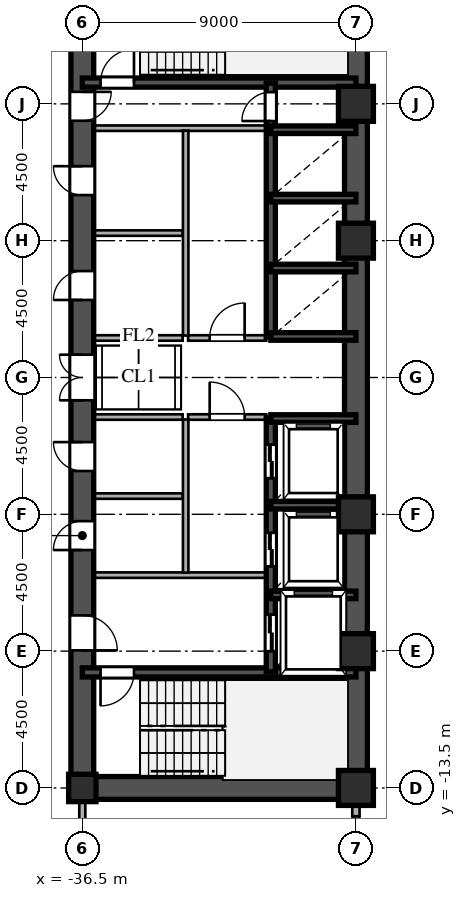
"""IFC4 building model, lengths in metres.
Left out: names, types, materials, properties, quantities, classifications, styles, units other than length and angle.
Written with IfcOpenShell. Run it as: python <this file> out.ifc"""

import sys

from ifc_helpers import new_model, si_unit, direction, frame, frame_2d, origin, origin_2d, place, context, subcontext, project, spatial, rectangle, hollow_rectangle, i_section, extrude, source, transform, mapped, element, fill, save


model = new_model("IFC4")
c1 = context("Model", 3, precision=1e-05, world=origin(), true_north=direction((0.0, 1.0)))
c2 = subcontext(c1, "Body", "Model", "MODEL_VIEW")
j1 = project(units=[si_unit("LENGTHUNIT", "METRE"), si_unit("PLANEANGLEUNIT", "RADIAN")], contexts=[c1])
p1 = place(None, origin())
s1 = spatial("IfcSite", under=j1, at=p1, CompositionType="ELEMENT")
p2 = place(p1, origin())
s2 = spatial("IfcBuilding", under=s1, at=p2, CompositionType="ELEMENT")
p3 = place(p2, frame((0.0, 0.0, 29.7)))
s3 = spatial("IfcBuildingStorey", under=s2, at=p3, CompositionType="ELEMENT", Elevation=29.7)
m1 = source(origin(), c2, "Body", "SweptSolid", [
    extrude(hollow_rectangle(XDim=1.15, YDim=1.15, WallThickness=0.048, at=origin_2d()), origin(), (0.0, 0.0, 1.0), 3.6),
])
for number, where, z_axis, x_axis in (
    (1, (-27.5, -13.5, 0.0), (0.0, 0.0, 1.0), (1.0, 0.0, 0.0)),
    (2, (-27.5, -9.0, 0.0), (0.0, 0.0, 1.0), (1.0, 0.0, 0.0)),
    (3, (-27.5, -4.5, 0.0), (0.0, 0.0, 1.0), (1.0, 0.0, 0.0)),
    (4, (-27.5, 4.5, 0.0), (0.0, 0.0, 1.0), (1.0, 0.0, 0.0)),
    (5, (-27.5, 9.0, 0.0), (0.0, 0.0, 1.0), (1.0, 0.0, 0.0)),
):
    element("IfcColumn", number, at=place(p3, frame(where, z_axis=z_axis, x_axis=x_axis)), inside=s3, PredefinedType="COLUMN", context=c2, shape_type="MappedRepresentation", body=[
        mapped(m1, transform((0.0, 0.0, 0.0), scale=1.0)),
    ])
m2 = source(origin(), c2, "Body", "SweptSolid", [
    extrude(i_section(OverallWidth=0.9, OverallDepth=0.9, WebThickness=0.036, FlangeThickness=0.055, at=origin_2d()), origin(), (0.0, 0.0, 1.0), 3.6),
])
p4 = place(p3, frame((-36.5, -13.5, 0.0), z_axis=(0.0, 0.0, 1.0), x_axis=(1.0, 0.0, 0.0)))
e6 = element("IfcColumn", 6, at=p4, inside=s3, PredefinedType="COLUMN", context=c2, shape_type="MappedRepresentation", body=[
    mapped(m2, transform((0.0, 0.0, 0.0), scale=1.0)),
])
p5 = place(p3, frame((-27.5, -14.43, 0.0), z_axis=(0.0, 0.0, 1.0), x_axis=(0.0, 1.0, 0.0)))
e7 = element("IfcWall", 7, at=p5, inside=s3, PredefinedType="SOLIDWALL", context=c2, shape_type="SweptSolid", body=[
    extrude(rectangle(XDim=0.55, YDim=0.24, at=frame_2d((0.275, 0.0))), origin(), (0.0, 0.0, 1.0), 2.88),
])
for number, where, z_axis, x_axis in (
    (8, (-27.5, -13.5, 0.0), (0.0, 0.0, 1.0), (0.0, 1.0, 0.0)),
    (9, (-27.5, 1.3, 0.0), (0.0, 0.0, 1.0), (0.0, 1.0, 0.0)),
):
    element("IfcWall", number, at=place(p3, frame(where, z_axis=z_axis, x_axis=x_axis)), inside=s3, PredefinedType="SHEAR", context=c2, shape_type="SweptSolid", body=[
        extrude(rectangle(XDim=12.2, YDim=0.75, at=frame_2d((6.1, 0.0))), origin(), (0.0, 0.0, 1.0), 3.38),
    ])
p6 = place(p3, frame((-27.5, -1.3, 0.0), z_axis=(0.0, 0.0, 1.0), x_axis=(0.0, 1.0, 0.0)))
e10 = element("IfcWall", 10, at=p6, inside=s3, PredefinedType="SHEAR", context=c2, shape_type="SweptSolid", body=[
    extrude(rectangle(XDim=2.6, YDim=0.75, at=frame_2d((1.3, 0.0))), origin(), (0.0, 0.0, 1.0), 3.38),
])
p7 = place(p3, frame((-36.5, -13.5, 0.0), z_axis=(0.0, 0.0, 1.0), x_axis=(1.0, 0.0, 0.0)))
e11 = element("IfcWall", 11, at=p7, inside=s3, PredefinedType="SHEAR", context=c2, shape_type="SweptSolid", body=[
    extrude(rectangle(XDim=9.0, YDim=0.75, at=frame_2d((4.5, 0.0))), origin(), (0.0, 0.0, 1.0), 3.38),
])
p8 = place(p3, frame((-36.5, -13.65, 0.0), z_axis=(0.0, 0.0, 1.0), x_axis=(0.0, 1.0, 0.0)))
e12 = element("IfcWall", 12, at=p8, inside=s3, PredefinedType="SHEAR", context=c2, shape_type="SweptSolid", body=[
    extrude(rectangle(XDim=7.15, YDim=0.75, at=frame_2d((3.575, 0.0))), origin(), (0.0, 0.0, 1.0), 3.38),
])
p9 = place(p8, frame((4.675, 0.0, 0.0)))
e13 = element("IfcOpeningElement", 13, at=p9, cuts=e12, PredefinedType="OPENING", context=c2, shape_type="SweptSolid", body=[
    extrude(rectangle(XDim=1.15, YDim=2.2, at=frame_2d((0.575, 1.1))), frame((0.0, 0.385, 0.0), z_axis=(0.0, -1.0, 0.0), x_axis=(1.0, 0.0, 0.0)), (0.0, 0.0, 1.0), 0.77),
])
p10 = place(p3, frame((-36.5, -1.3, 0.0), z_axis=(0.0, 0.0, 1.0), x_axis=(0.0, 1.0, 0.0)))
e14 = element("IfcWall", 14, at=p10, inside=s3, PredefinedType="SHEAR", context=c2, shape_type="SweptSolid", body=[
    extrude(rectangle(XDim=2.6, YDim=0.75, at=frame_2d((1.3, 0.0))), origin(), (0.0, 0.0, 1.0), 3.38),
])
p11 = place(p10, frame((0.55, 0.0, 0.0)))
e15 = element("IfcOpeningElement", 15, at=p11, cuts=e14, PredefinedType="OPENING", context=c2, shape_type="SweptSolid", body=[
    extrude(rectangle(XDim=1.5, YDim=2.3, at=frame_2d((0.75, 1.15))), frame((0.0, 0.385, 0.0), z_axis=(0.0, -1.0, 0.0), x_axis=(1.0, 0.0, 0.0)), (0.0, 0.0, 1.0), 0.77),
])
p12 = place(p3, frame((-36.5, 8.2, 0.0), z_axis=(0.0, 0.0, 1.0), x_axis=(0.0, 1.0, 0.0)))
e16 = element("IfcWall", 16, at=p12, inside=s3, PredefinedType="SHEAR", context=c2, shape_type="SweptSolid", body=[
    extrude(rectangle(XDim=5.45, YDim=0.75, at=frame_2d((2.725, 0.0))), origin(), (0.0, 0.0, 1.0), 3.38),
])
p13 = place(p12, frame((0.245, 0.0, 0.0)))
e17 = element("IfcOpeningElement", 17, at=p13, cuts=e16, PredefinedType="OPENING", context=c2, shape_type="SweptSolid", body=[
    extrude(rectangle(XDim=0.95, YDim=2.15, at=frame_2d((0.475, 1.075))), frame((0.0, 0.385, 0.0), z_axis=(0.0, -1.0, 0.0), x_axis=(1.0, 0.0, 0.0)), (0.0, 0.0, 1.0), 0.77),
])
p14 = place(p3, frame((-36.5, -6.5, 0.0), z_axis=(0.0, 0.0, 1.0), x_axis=(0.0, 1.0, 0.0)))
e18 = element("IfcWall", 18, at=p14, inside=s3, PredefinedType="SHEAR", context=c2, shape_type="SweptSolid", body=[
    extrude(rectangle(XDim=2.6, YDim=0.75, at=frame_2d((1.3, 0.0))), origin(), (0.0, 0.0, 1.0), 3.38),
])
p15 = place(p14, frame((0.825, 0.0, 0.0)))
e19 = element("IfcOpeningElement", 19, at=p15, cuts=e18, PredefinedType="OPENING", context=c2, shape_type="SweptSolid", body=[
    extrude(rectangle(XDim=0.95, YDim=2.15, at=frame_2d((0.475, 1.075))), frame((0.0, 0.385, 0.0), z_axis=(0.0, -1.0, 0.0), x_axis=(1.0, 0.0, 0.0)), (0.0, 0.0, 1.0), 0.77),
])
p16 = place(p3, frame((-36.5, -3.9, 0.0), z_axis=(0.0, 0.0, 1.0), x_axis=(0.0, 1.0, 0.0)))
e20 = element("IfcWall", 20, at=p16, inside=s3, PredefinedType="SHEAR", context=c2, shape_type="SweptSolid", body=[
    extrude(rectangle(XDim=2.6, YDim=0.75, at=frame_2d((1.3, 0.0))), origin(), (0.0, 0.0, 1.0), 3.38),
])
p17 = place(p16, frame((0.825, 0.0, 0.0)))
e21 = element("IfcOpeningElement", 21, at=p17, cuts=e20, PredefinedType="OPENING", context=c2, shape_type="SweptSolid", body=[
    extrude(rectangle(XDim=0.95, YDim=2.15, at=frame_2d((0.475, 1.075))), frame((0.0, 0.385, 0.0), z_axis=(0.0, -1.0, 0.0), x_axis=(1.0, 0.0, 0.0)), (0.0, 0.0, 1.0), 0.77),
])
p18 = place(p3, frame((-36.5, 1.3, 0.0), z_axis=(0.0, 0.0, 1.0), x_axis=(0.0, 1.0, 0.0)))
e22 = element("IfcWall", 22, at=p18, inside=s3, PredefinedType="SHEAR", context=c2, shape_type="SweptSolid", body=[
    extrude(rectangle(XDim=3.45, YDim=0.75, at=frame_2d((1.725, 0.0))), origin(), (0.0, 0.0, 1.0), 3.38),
])
p19 = place(p18, frame((1.25, 0.0, 0.0)))
e23 = element("IfcOpeningElement", 23, at=p19, cuts=e22, PredefinedType="OPENING", context=c2, shape_type="SweptSolid", body=[
    extrude(rectangle(XDim=0.95, YDim=2.15, at=frame_2d((0.475, 1.075))), frame((0.0, 0.385, 0.0), z_axis=(0.0, -1.0, 0.0), x_axis=(1.0, 0.0, 0.0)), (0.0, 0.0, 1.0), 0.77),
])
p20 = place(p3, frame((-36.5, 4.75, 0.0), z_axis=(0.0, 0.0, 1.0), x_axis=(0.0, 1.0, 0.0)))
e24 = element("IfcWall", 24, at=p20, inside=s3, PredefinedType="SHEAR", context=c2, shape_type="SweptSolid", body=[
    extrude(rectangle(XDim=3.45, YDim=0.75, at=frame_2d((1.725, 0.0))), origin(), (0.0, 0.0, 1.0), 3.38),
])
p21 = place(p20, frame((1.25, 0.0, 0.0)))
e25 = element("IfcOpeningElement", 25, at=p21, cuts=e24, PredefinedType="OPENING", context=c2, shape_type="SweptSolid", body=[
    extrude(rectangle(XDim=0.95, YDim=2.15, at=frame_2d((0.475, 1.075))), frame((0.0, 0.385, 0.0), z_axis=(0.0, -1.0, 0.0), x_axis=(1.0, 0.0, 0.0)), (0.0, 0.0, 1.0), 0.77),
])
p22 = place(p3, frame((-36.5, -9.7, 0.0), z_axis=(0.0, 0.0, 1.0), x_axis=(1.0, 0.0, 0.0)))
e26 = element("IfcWall", 26, at=p22, inside=s3, PredefinedType="SHEAR", context=c2, shape_type="SweptSolid", body=[
    extrude(rectangle(XDim=9.0, YDim=0.3, at=frame_2d((4.5, 0.0))), origin(), (0.0, 0.0, 1.0), 3.38),
])
p23 = place(p22, frame((0.6, 0.0, 0.0)))
e27 = element("IfcOpeningElement", 27, at=p23, cuts=e26, PredefinedType="OPENING", context=c2, shape_type="SweptSolid", body=[
    extrude(rectangle(XDim=1.1, YDim=2.2, at=frame_2d((0.55, 1.1))), frame((0.0, 0.16, 0.0), z_axis=(0.0, -1.0, 0.0), x_axis=(1.0, 0.0, 0.0)), (0.0, 0.0, 1.0), 0.32),
])
p24 = place(p3, frame((-36.5, 9.7, 0.0), z_axis=(0.0, 0.0, 1.0), x_axis=(1.0, 0.0, 0.0)))
e28 = element("IfcWall", 28, at=p24, inside=s3, PredefinedType="SHEAR", context=c2, shape_type="SweptSolid", body=[
    extrude(rectangle(XDim=9.0, YDim=0.3, at=frame_2d((4.5, 0.0))), origin(), (0.0, 0.0, 1.0), 3.38),
])
p25 = place(p24, frame((0.6, 0.0, 0.0)))
e29 = element("IfcOpeningElement", 29, at=p25, cuts=e28, PredefinedType="OPENING", context=c2, shape_type="SweptSolid", body=[
    extrude(rectangle(XDim=1.1, YDim=2.2, at=frame_2d((0.55, 1.1))), frame((0.0, 0.16, 0.0), z_axis=(0.0, -1.0, 0.0), x_axis=(1.0, 0.0, 0.0)), (0.0, 0.0, 1.0), 0.32),
])
for number, where, z_axis, x_axis in (
    (30, (-30.3, -7.15, 0.0), (0.0, 0.0, 1.0), (1.0, 0.0, 0.0)),
    (31, (-30.3, -4.2, 0.0), (0.0, 0.0, 1.0), (1.0, 0.0, 0.0)),
    (32, (-30.3, -1.35, 0.0), (0.0, 0.0, 1.0), (1.0, 0.0, 0.0)),
    (33, (-30.3, 1.35, 0.0), (0.0, 0.0, 1.0), (1.0, 0.0, 0.0)),
    (34, (-30.3, 3.6, 0.0), (0.0, 0.0, 1.0), (1.0, 0.0, 0.0)),
    (35, (-30.3, 5.9, 0.0), (0.0, 0.0, 1.0), (1.0, 0.0, 0.0)),
    (36, (-30.3, 8.15, 0.0), (0.0, 0.0, 1.0), (1.0, 0.0, 0.0)),
):
    element("IfcWall", number, at=place(p3, frame(where, z_axis=z_axis, x_axis=x_axis)), inside=s3, PredefinedType="SHEAR", context=c2, shape_type="SweptSolid", body=[
        extrude(rectangle(XDim=2.8, YDim=0.25, at=frame_2d((1.4, 0.0))), origin(), (0.0, 0.0, 1.0), 3.38),
    ])
p26 = place(p3, frame((-30.3, -9.68, 0.0), z_axis=(0.0, 0.0, 1.0), x_axis=(0.0, 1.0, 0.0)))
e37 = element("IfcWall", 37, at=p26, inside=s3, PredefinedType="SHEAR", context=c2, shape_type="SweptSolid", body=[
    extrude(rectangle(XDim=2.56, YDim=0.3, at=frame_2d((1.28, 0.0))), origin(), (0.0, 0.0, 1.0), 3.38),
])
p27 = place(p26, frame((0.68, 0.0, 0.0)))
e38 = element("IfcOpeningElement", 38, at=p27, cuts=e37, PredefinedType="OPENING", context=c2, shape_type="SweptSolid", body=[
    extrude(rectangle(XDim=1.2, YDim=2.25, at=frame_2d((0.6, 1.125))), frame((0.0, 0.16, 0.0), z_axis=(0.0, -1.0, 0.0), x_axis=(1.0, 0.0, 0.0)), (0.0, 0.0, 1.0), 0.32),
])
p28 = place(p3, frame((-30.3, -7.12, 0.0), z_axis=(0.0, 0.0, 1.0), x_axis=(0.0, 1.0, 0.0)))
e39 = element("IfcWall", 39, at=p28, inside=s3, PredefinedType="SHEAR", context=c2, shape_type="SweptSolid", body=[
    extrude(rectangle(XDim=2.92, YDim=0.3, at=frame_2d((1.46, 0.0))), origin(), (0.0, 0.0, 1.0), 3.38),
])
p29 = place(p28, frame((0.91, 0.0, 0.0)))
e40 = element("IfcOpeningElement", 40, at=p29, cuts=e39, PredefinedType="OPENING", context=c2, shape_type="SweptSolid", body=[
    extrude(rectangle(XDim=1.1, YDim=2.2, at=frame_2d((0.55, 1.1))), frame((0.0, 0.16, 0.0), z_axis=(0.0, -1.0, 0.0), x_axis=(1.0, 0.0, 0.0)), (0.0, 0.0, 1.0), 0.32),
])
p30 = place(p3, frame((-30.3, -4.2, 0.0), z_axis=(0.0, 0.0, 1.0), x_axis=(0.0, 1.0, 0.0)))
e41 = element("IfcWall", 41, at=p30, inside=s3, PredefinedType="SHEAR", context=c2, shape_type="SweptSolid", body=[
    extrude(rectangle(XDim=2.88, YDim=0.3, at=frame_2d((1.44, 0.0))), origin(), (0.0, 0.0, 1.0), 3.38),
])
p31 = place(p30, frame((0.89, 0.0, 0.0)))
e42 = element("IfcOpeningElement", 42, at=p31, cuts=e41, PredefinedType="OPENING", context=c2, shape_type="SweptSolid", body=[
    extrude(rectangle(XDim=1.1, YDim=2.2, at=frame_2d((0.55, 1.1))), frame((0.0, 0.16, 0.0), z_axis=(0.0, -1.0, 0.0), x_axis=(1.0, 0.0, 0.0)), (0.0, 0.0, 1.0), 0.32),
])
p32 = place(p3, frame((-30.3, 1.32, 0.0), z_axis=(0.0, 0.0, 1.0), x_axis=(0.0, 1.0, 0.0)))
e43 = element("IfcWall", 43, at=p32, inside=s3, PredefinedType="SHEAR", context=c2, shape_type="SweptSolid", body=[
    extrude(rectangle(XDim=2.28, YDim=0.3, at=frame_2d((1.14, 0.0))), origin(), (0.0, 0.0, 1.0), 3.38),
])
p33 = place(p3, frame((-30.3, 3.6, 0.0), z_axis=(0.0, 0.0, 1.0), x_axis=(0.0, 1.0, 0.0)))
e44 = element("IfcWall", 44, at=p33, inside=s3, PredefinedType="SHEAR", context=c2, shape_type="SweptSolid", body=[
    extrude(rectangle(XDim=2.3, YDim=0.3, at=frame_2d((1.15, 0.0))), origin(), (0.0, 0.0, 1.0), 3.38),
])
p34 = place(p3, frame((-30.3, 5.9, 0.0), z_axis=(0.0, 0.0, 1.0), x_axis=(0.0, 1.0, 0.0)))
e45 = element("IfcWall", 45, at=p34, inside=s3, PredefinedType="SHEAR", context=c2, shape_type="SweptSolid", body=[
    extrude(rectangle(XDim=2.25, YDim=0.3, at=frame_2d((1.125, 0.0))), origin(), (0.0, 0.0, 1.0), 3.38),
])
p35 = place(p3, frame((-30.3, 8.15, 0.0), z_axis=(0.0, 0.0, 1.0), x_axis=(0.0, 1.0, 0.0)))
e46 = element("IfcWall", 46, at=p35, inside=s3, PredefinedType="SHEAR", context=c2, shape_type="SweptSolid", body=[
    extrude(rectangle(XDim=1.53, YDim=0.3, at=frame_2d((0.765, 0.0))), origin(), (0.0, 0.0, 1.0), 3.38),
])
p36 = place(p35, frame((0.285, 0.0, 0.0)))
e47 = element("IfcOpeningElement", 47, at=p36, cuts=e46, PredefinedType="OPENING", context=c2, shape_type="SweptSolid", body=[
    extrude(rectangle(XDim=0.95, YDim=2.15, at=frame_2d((0.475, 1.075))), frame((0.0, 0.16, 0.0), z_axis=(0.0, -1.0, 0.0), x_axis=(1.0, 0.0, 0.0)), (0.0, 0.0, 1.0), 0.32),
])
for number, where, z_axis, x_axis in (
    (48, (-36.15, -6.5, 0.0), (0.0, 0.0, 1.0), (1.0, 0.0, 0.0)),
    (49, (-36.15, 8.2, 0.0), (0.0, 0.0, 1.0), (1.0, 0.0, 0.0)),
):
    element("IfcWall", number, at=place(p3, frame(where, z_axis=z_axis, x_axis=x_axis)), inside=s3, PredefinedType="PARTITIONING", context=c2, shape_type="SweptSolid", body=[
        extrude(rectangle(XDim=5.7, YDim=0.18, at=frame_2d((2.85, 0.0))), origin(), (0.0, 0.0, 1.0), 3.38),
    ])
p37 = place(p3, frame((-33.1, -6.42, 0.0), z_axis=(0.0, 0.0, 1.0), x_axis=(0.0, 1.0, 0.0)))
e50 = element("IfcWall", 50, at=p37, inside=s3, PredefinedType="PARTITIONING", context=c2, shape_type="SweptSolid", body=[
    extrude(rectangle(XDim=5.04, YDim=0.18, at=frame_2d((2.52, 0.0))), origin(), (0.0, 0.0, 1.0), 3.38),
])
p38 = place(p3, frame((-33.1, 1.38, 0.0), z_axis=(0.0, 0.0, 1.0), x_axis=(0.0, 1.0, 0.0)))
e51 = element("IfcWall", 51, at=p38, inside=s3, PredefinedType="PARTITIONING", context=c2, shape_type="SweptSolid", body=[
    extrude(rectangle(XDim=6.74, YDim=0.18, at=frame_2d((3.37, 0.0))), origin(), (0.0, 0.0, 1.0), 3.38),
])
p39 = place(p3, frame((-33.02, -1.3, 0.0), z_axis=(0.0, 0.0, 1.0), x_axis=(1.0, 0.0, 0.0)))
e52 = element("IfcWall", 52, at=p39, inside=s3, PredefinedType="PARTITIONING", context=c2, shape_type="SweptSolid", body=[
    extrude(rectangle(XDim=2.57, YDim=0.18, at=frame_2d((1.285, 0.0))), origin(), (0.0, 0.0, 1.0), 3.38),
])
p40 = place(p39, frame((0.71, 0.0, 0.0)))
e53 = element("IfcOpeningElement", 53, at=p40, cuts=e52, PredefinedType="OPENING", context=c2, shape_type="SweptSolid", body=[
    extrude(rectangle(XDim=1.15, YDim=2.2, at=frame_2d((0.575, 1.1))), frame((0.0, 0.1, 0.0), z_axis=(0.0, -1.0, 0.0), x_axis=(1.0, 0.0, 0.0)), (0.0, 0.0, 1.0), 0.2),
])
p41 = place(p3, frame((-33.02, 1.3, 0.0), z_axis=(0.0, 0.0, 1.0), x_axis=(1.0, 0.0, 0.0)))
e54 = element("IfcWall", 54, at=p41, inside=s3, PredefinedType="PARTITIONING", context=c2, shape_type="SweptSolid", body=[
    extrude(rectangle(XDim=2.57, YDim=0.18, at=frame_2d((1.285, 0.0))), origin(), (0.0, 0.0, 1.0), 3.38),
])
p42 = place(p41, frame((0.71, 0.0, 0.0)))
e55 = element("IfcOpeningElement", 55, at=p42, cuts=e54, PredefinedType="OPENING", context=c2, shape_type="SweptSolid", body=[
    extrude(rectangle(XDim=1.15, YDim=2.2, at=frame_2d((0.575, 1.1))), frame((0.0, 0.1, 0.0), z_axis=(0.0, -1.0, 0.0), x_axis=(1.0, 0.0, 0.0)), (0.0, 0.0, 1.0), 0.2),
])
for number, where, z_axis, x_axis in (
    (56, (-36.15, -1.3, 0.0), (0.0, 0.0, 1.0), (1.0, 0.0, 0.0)),
    (57, (-36.15, 1.3, 0.0), (0.0, 0.0, 1.0), (1.0, 0.0, 0.0)),
    (58, (-36.15, -3.9, 0.0), (0.0, 0.0, 1.0), (1.0, 0.0, 0.0)),
    (59, (-36.15, 4.75, 0.0), (0.0, 0.0, 1.0), (1.0, 0.0, 0.0)),
):
    element("IfcWall", number, at=place(p3, frame(where, z_axis=z_axis, x_axis=x_axis)), inside=s3, PredefinedType="PARTITIONING", context=c2, shape_type="SweptSolid", body=[
        extrude(rectangle(XDim=2.95, YDim=0.18, at=frame_2d((1.475, 0.0))), origin(), (0.0, 0.0, 1.0), 3.38),
    ])
p43 = place(p3, frame((-36.5, -15.515, 0.0), z_axis=(0.0, 0.0, 1.0), x_axis=(0.0, 1.0, 0.0)))
e60 = element("IfcWall", 60, at=p43, inside=s3, PredefinedType="PARTITIONING", context=c2, shape_type="SweptSolid", body=[
    extrude(rectangle(XDim=1.635, YDim=0.2, at=frame_2d((0.817, 0.0))), origin(), (0.0, 0.0, 1.0), 2.68),
])
m3 = source(origin(), c2, "Body", "SweptSolid", [
    extrude(rectangle(XDim=1.15, YDim=2.2, at=frame_2d((0.575, 1.1))), frame((0.0, 0.025, 0.0), z_axis=(0.0, -1.0, 0.0), x_axis=(1.0, 0.0, 0.0)), (0.0, 0.0, 1.0), 0.05),
])
p44 = place(p9, frame((1.15, 0.0, 0.0), z_axis=(0.0, 0.0, 1.0), x_axis=(-1.0, 0.0, 0.0)))
e61 = element("IfcDoor", 61, at=p44, inside=s3, OperationType="SINGLE_SWING_LEFT", PredefinedType="DOOR", context=c2, shape_type="MappedRepresentation", body=[
    mapped(m3, transform((0.0, 0.0, 0.0), scale=1.0)),
])
fill(e13, e61)
m4 = source(origin(), c2, "Body", "SweptSolid", [
    extrude(rectangle(XDim=1.5, YDim=2.3, at=frame_2d((0.75, 1.15))), frame((0.0, 0.025, 0.0), z_axis=(0.0, -1.0, 0.0), x_axis=(1.0, 0.0, 0.0)), (0.0, 0.0, 1.0), 0.05),
])
p45 = place(p11, origin())
e62 = element("IfcDoor", 62, at=p45, inside=s3, OperationType="DOUBLE_SWING_LEFT", PredefinedType="DOOR", context=c2, shape_type="MappedRepresentation", body=[
    mapped(m4, transform((0.0, 0.0, 0.0), scale=1.0)),
])
fill(e15, e62)
m5 = source(origin(), c2, "Body", "SweptSolid", [
    extrude(rectangle(XDim=0.95, YDim=2.15, at=frame_2d((0.475, 1.075))), frame((0.0, 0.025, 0.0), z_axis=(0.0, -1.0, 0.0), x_axis=(1.0, 0.0, 0.0)), (0.0, 0.0, 1.0), 0.05),
])
p46 = place(p13, frame((0.95, 0.0, 0.0), z_axis=(0.0, 0.0, 1.0), x_axis=(-1.0, 0.0, 0.0)))
e63 = element("IfcDoor", 63, at=p46, inside=s3, OperationType="SINGLE_SWING_RIGHT", PredefinedType="DOOR", context=c2, shape_type="MappedRepresentation", body=[
    mapped(m5, transform((0.0, 0.0, 0.0), scale=1.0)),
])
fill(e17, e63)
p47 = place(p15, origin())
e64 = element("IfcDoor", 64, at=p47, inside=s3, OperationType="SINGLE_SWING_LEFT", PredefinedType="DOOR", context=c2, shape_type="MappedRepresentation", body=[
    mapped(m5, transform((0.0, 0.0, 0.0), scale=1.0)),
])
fill(e19, e64)
p48 = place(p17, origin())
e65 = element("IfcDoor", 65, at=p48, inside=s3, OperationType="SINGLE_SWING_RIGHT", PredefinedType="DOOR", context=c2, shape_type="MappedRepresentation", body=[
    mapped(m5, transform((0.0, 0.0, 0.0), scale=1.0)),
])
fill(e21, e65)
p49 = place(p19, origin())
e66 = element("IfcDoor", 66, at=p49, inside=s3, OperationType="SINGLE_SWING_LEFT", PredefinedType="DOOR", context=c2, shape_type="MappedRepresentation", body=[
    mapped(m5, transform((0.0, 0.0, 0.0), scale=1.0)),
])
fill(e23, e66)
p50 = place(p21, origin())
e67 = element("IfcDoor", 67, at=p50, inside=s3, OperationType="SINGLE_SWING_RIGHT", PredefinedType="DOOR", context=c2, shape_type="MappedRepresentation", body=[
    mapped(m5, transform((0.0, 0.0, 0.0), scale=1.0)),
])
fill(e25, e67)
m6 = source(origin(), c2, "Body", "SweptSolid", [
    extrude(rectangle(XDim=1.1, YDim=2.2, at=frame_2d((0.55, 1.1))), frame((0.0, 0.025, 0.0), z_axis=(0.0, -1.0, 0.0), x_axis=(1.0, 0.0, 0.0)), (0.0, 0.0, 1.0), 0.05),
])
p51 = place(p23, frame((1.1, 0.0, 0.0), z_axis=(0.0, 0.0, 1.0), x_axis=(-1.0, 0.0, 0.0)))
e68 = element("IfcDoor", 68, at=p51, inside=s3, OperationType="SINGLE_SWING_LEFT", PredefinedType="DOOR", context=c2, shape_type="MappedRepresentation", body=[
    mapped(m6, transform((0.0, 0.0, 0.0), scale=1.0)),
])
fill(e27, e68)
p52 = place(p25, origin())
e69 = element("IfcDoor", 69, at=p52, inside=s3, OperationType="SINGLE_SWING_RIGHT", PredefinedType="DOOR", context=c2, shape_type="MappedRepresentation", body=[
    mapped(m6, transform((0.0, 0.0, 0.0), scale=1.0)),
])
fill(e29, e69)
m7 = source(origin(), c2, "Body", "SweptSolid", [
    extrude(rectangle(XDim=1.2, YDim=2.25, at=frame_2d((0.6, 1.125))), frame((0.0, 0.025, 0.0), z_axis=(0.0, -1.0, 0.0), x_axis=(1.0, 0.0, 0.0)), (0.0, 0.0, 1.0), 0.05),
])
p53 = place(p27, origin())
e70 = element("IfcDoor", 70, at=p53, inside=s3, OperationType="DOUBLE_DOOR_SLIDING", PredefinedType="DOOR", context=c2, shape_type="MappedRepresentation", body=[
    mapped(m7, transform((0.0, 0.0, 0.0), scale=1.0)),
])
fill(e38, e70)
m8 = source(origin(), c2, "Body", "SweptSolid", [
    extrude(rectangle(XDim=1.1, YDim=2.2, at=frame_2d((0.55, 1.1))), frame((0.0, 0.025, 0.0), z_axis=(0.0, -1.0, 0.0), x_axis=(1.0, 0.0, 0.0)), (0.0, 0.0, 1.0), 0.05),
])
p54 = place(p29, origin())
e71 = element("IfcDoor", 71, at=p54, inside=s3, OperationType="DOUBLE_DOOR_SLIDING", PredefinedType="DOOR", context=c2, shape_type="MappedRepresentation", body=[
    mapped(m8, transform((0.0, 0.0, 0.0), scale=1.0)),
])
fill(e40, e71)
p55 = place(p31, origin())
e72 = element("IfcDoor", 72, at=p55, inside=s3, OperationType="DOUBLE_DOOR_SLIDING", PredefinedType="DOOR", context=c2, shape_type="MappedRepresentation", body=[
    mapped(m8, transform((0.0, 0.0, 0.0), scale=1.0)),
])
fill(e42, e72)
p56 = place(p36, origin())
e73 = element("IfcDoor", 73, at=p56, inside=s3, OperationType="SINGLE_SWING_LEFT", PredefinedType="DOOR", context=c2, shape_type="MappedRepresentation", body=[
    mapped(m5, transform((0.0, 0.0, 0.0), scale=1.0)),
])
fill(e47, e73)
p57 = place(p40, origin())
e74 = element("IfcDoor", 74, at=p57, inside=s3, OperationType="SINGLE_SWING_LEFT", PredefinedType="DOOR", context=c2, shape_type="MappedRepresentation", body=[
    mapped(m3, transform((0.0, 0.0, 0.0), scale=1.0)),
])
fill(e53, e74)
p58 = place(p42, origin())
e75 = element("IfcDoor", 75, at=p58, inside=s3, OperationType="SINGLE_SWING_RIGHT", PredefinedType="DOOR", context=c2, shape_type="MappedRepresentation", body=[
    mapped(m3, transform((0.0, 0.0, 0.0), scale=1.0)),
])
fill(e55, e75)
save(model, sys.argv[1])
